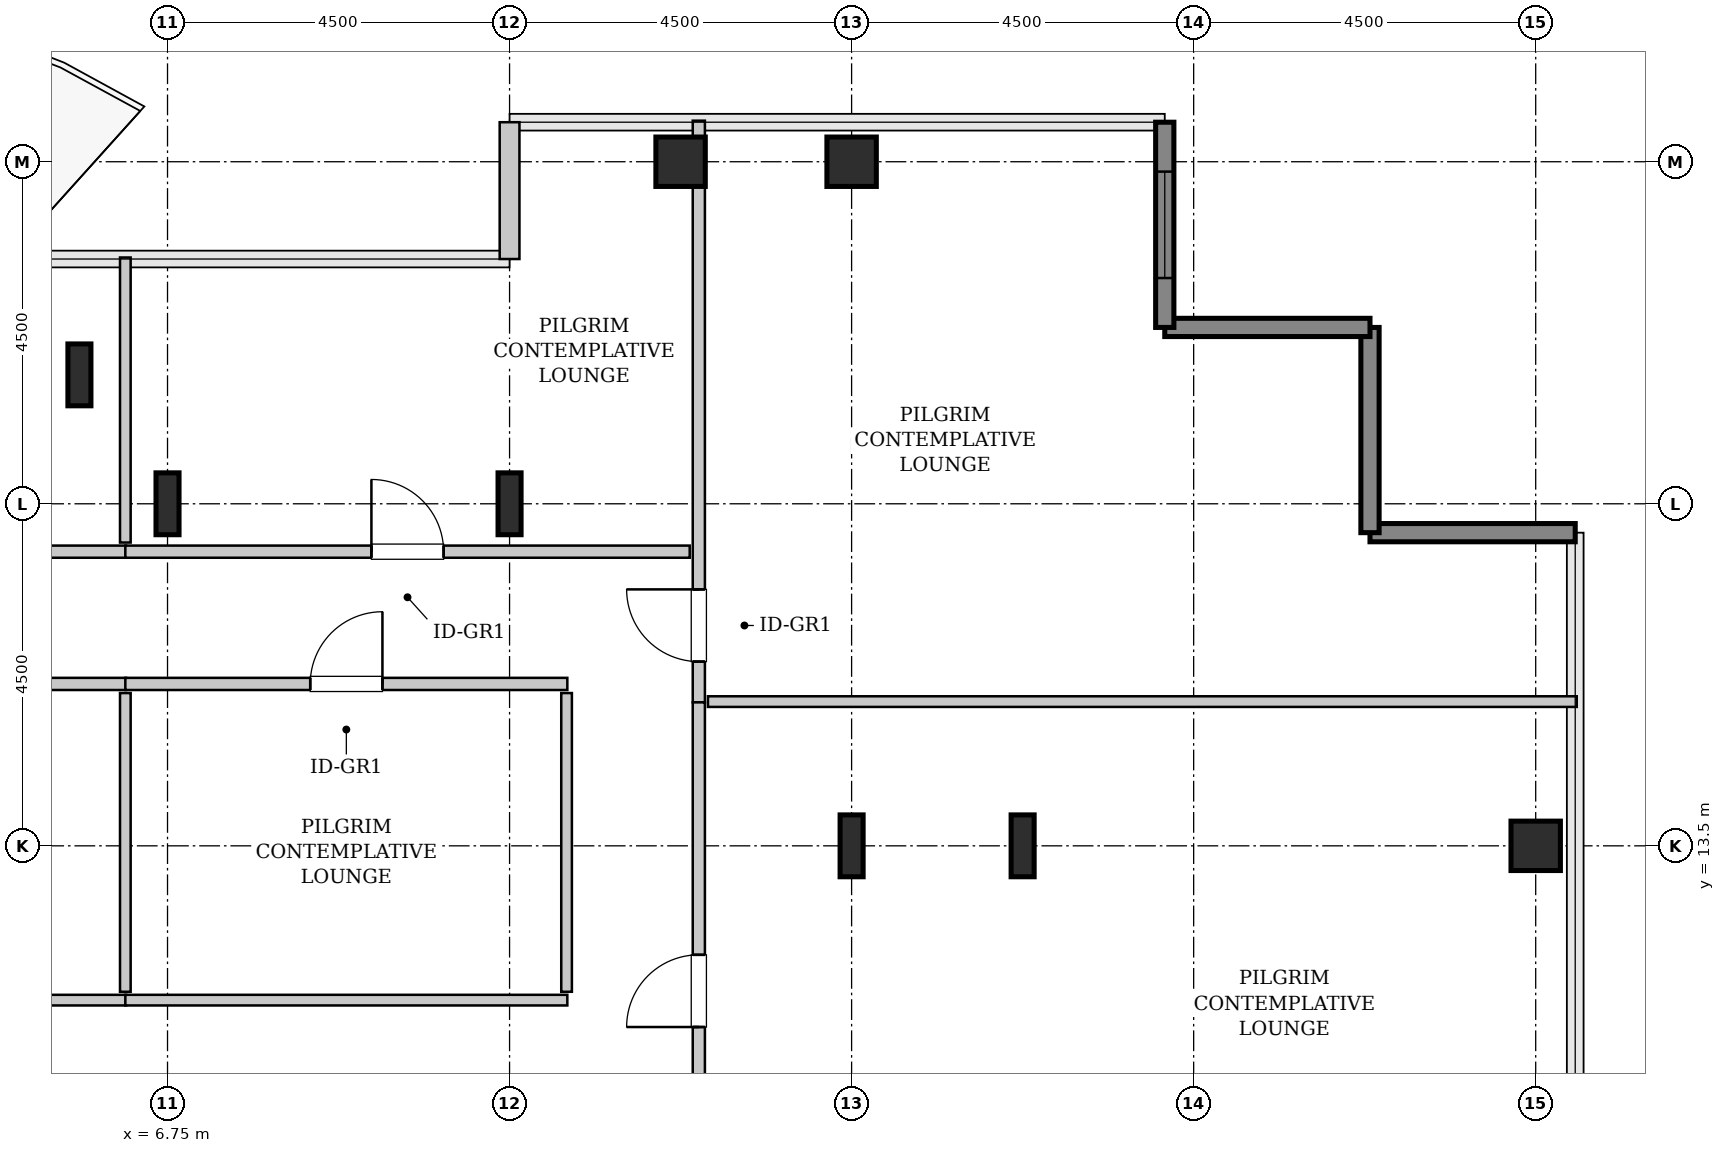
"""IFC4 building model, lengths in metres.
Left out: names, types, materials, properties, quantities, classifications, styles, units other than length and angle.
Written with IfcOpenShell. Run it as: python <this file> out.ifc"""

import sys

from ifc_helpers import new_model, si_unit, direction, frame, frame_2d, origin, origin_2d, place, context, subcontext, project, spatial, rectangle, hollow_rectangle, i_section, extrude, source, transform, mapped, element, fill, save


model = new_model("IFC4")
c1 = context("Model", 3, precision=1e-05, world=origin(), true_north=direction((0.0, 1.0)))
c2 = subcontext(c1, "Body", "Model", "MODEL_VIEW")
j1 = project(units=[si_unit("LENGTHUNIT", "METRE"), si_unit("PLANEANGLEUNIT", "RADIAN")], contexts=[c1])
p1 = place(None, origin())
s1 = spatial("IfcSite", under=j1, at=p1, CompositionType="ELEMENT")
p2 = place(p1, origin())
s2 = spatial("IfcBuilding", under=s1, at=p2, CompositionType="ELEMENT")
p3 = place(p2, frame((0.0, 0.0, 233.2)))
s3 = spatial("IfcBuildingStorey", under=s2, at=p3, CompositionType="ELEMENT", Elevation=233.2)
m1 = source(origin(), c2, "Body", "SweptSolid", [
    extrude(i_section(OverallWidth=0.303, OverallDepth=0.814, WebThickness=0.021, FlangeThickness=0.04, FilletRadius=0.03, at=origin_2d()), origin(), (0.0, 0.0, 1.0), 3.8),
])
for number, where, z_axis, x_axis in (
    (1, (5.591, 19.696, 0.0), (0.0, 0.0, 1.0), (1.0, 0.0, 0.0)),
    (2, (6.75, 18.0, 0.0), (0.0, 0.0, 1.0), (1.0, 0.0, 0.0)),
    (3, (11.25, 18.0, 0.0), (0.0, 0.0, 1.0), (1.0, 0.0, 0.0)),
):
    element("IfcColumn", number, at=place(p3, frame(where, z_axis=z_axis, x_axis=x_axis)), inside=s3, PredefinedType="COLUMN", context=c2, shape_type="MappedRepresentation", body=[
        mapped(m1, transform((0.0, 0.0, 0.0), x_axis=(1.0, 0.0, 0.0), y_axis=(0.0, 1.0, 0.0), z_axis=(0.0, 0.0, 1.0), scale=1.0)),
    ])
m2 = source(origin(), c2, "Body", "SweptSolid", [
    extrude(hollow_rectangle(XDim=0.65, YDim=0.65, WallThickness=0.032, InnerFilletRadius=0.032, OuterFilletRadius=0.064, at=origin_2d()), origin(), (0.0, 0.0, 1.0), 3.8),
])
p4 = place(p3, frame((13.5, 22.5, 0.0), z_axis=(0.0, 0.0, 1.0), x_axis=(1.0, 0.0, 0.0)))
e4 = element("IfcColumn", 4, at=p4, inside=s3, PredefinedType="COLUMN", context=c2, shape_type="MappedRepresentation", body=[
    mapped(m2, transform((0.0, 0.0, 0.0), x_axis=(1.0, 0.0, 0.0), y_axis=(0.0, 1.0, 0.0), z_axis=(0.0, 0.0, 1.0), scale=1.0)),
])
p5 = place(p3, frame((15.75, 13.5, 0.0), z_axis=(0.0, 0.0, 1.0), x_axis=(1.0, 0.0, 0.0)))
e5 = element("IfcColumn", 5, at=p5, inside=s3, PredefinedType="COLUMN", context=c2, shape_type="MappedRepresentation", body=[
    mapped(m1, transform((0.0, 0.0, 0.0), x_axis=(1.0, 0.0, 0.0), y_axis=(0.0, 1.0, 0.0), z_axis=(0.0, 0.0, 1.0), scale=1.0)),
])
p6 = place(p3, frame((15.75, 22.5, 0.0), z_axis=(0.0, 0.0, 1.0), x_axis=(1.0, 0.0, 0.0)))
e6 = element("IfcColumn", 6, at=p6, inside=s3, PredefinedType="COLUMN", context=c2, shape_type="MappedRepresentation", body=[
    mapped(m2, transform((0.0, 0.0, 0.0), x_axis=(1.0, 0.0, 0.0), y_axis=(0.0, 1.0, 0.0), z_axis=(0.0, 0.0, 1.0), scale=1.0)),
])
p7 = place(p3, frame((18.0, 13.5, 0.0), z_axis=(0.0, 0.0, 1.0), x_axis=(1.0, 0.0, 0.0)))
e7 = element("IfcColumn", 7, at=p7, inside=s3, PredefinedType="COLUMN", context=c2, shape_type="MappedRepresentation", body=[
    mapped(m1, transform((0.0, 0.0, 0.0), x_axis=(1.0, 0.0, 0.0), y_axis=(0.0, 1.0, 0.0), z_axis=(0.0, 0.0, 1.0), scale=1.0)),
])
p8 = place(p3, frame((24.75, 13.5, 0.0), z_axis=(0.0, 0.0, 1.0), x_axis=(1.0, 0.0, 0.0)))
e8 = element("IfcColumn", 8, at=p8, inside=s3, PredefinedType="COLUMN", context=c2, shape_type="MappedRepresentation", body=[
    mapped(m2, transform((0.0, 0.0, 0.0), x_axis=(1.0, 0.0, 0.0), y_axis=(0.0, 1.0, 0.0), z_axis=(0.0, 0.0, 1.0), scale=1.0)),
])
m3 = source(origin(), c2, "Body", "SweptSolid", [
    extrude(rectangle(XDim=2.7, YDim=0.24, at=frame_2d((1.35, 0.0))), origin(), (0.0, 0.0, 1.0), 3.55),
])
for number, where, z_axis, x_axis in (
    (9, (25.27, 17.62, 0.0), (0.0, 0.0, 1.0), (-1.0, 0.0, 0.0)),
    (10, (22.57, 17.62, 0.0), (0.0, 0.0, 1.0), (0.0, 1.0, 0.0)),
    (11, (22.57, 20.32, 0.0), (0.0, 0.0, 1.0), (-1.0, 0.0, 0.0)),
):
    element("IfcWall", number, at=place(p3, frame(where, z_axis=z_axis, x_axis=x_axis)), inside=s3, PredefinedType="SHEAR", context=c2, shape_type="MappedRepresentation", body=[
        mapped(m3, transform((0.0, 0.0, 0.0), x_axis=(1.0, 0.0, 0.0), y_axis=(0.0, 1.0, 0.0), z_axis=(0.0, 0.0, 1.0), scale=1.0)),
    ])
p9 = place(p3, frame((19.87, 20.32, 0.0), z_axis=(0.0, 0.0, 1.0), x_axis=(0.0, 1.0, 0.0)))
e12 = element("IfcWall", 12, at=p9, inside=s3, PredefinedType="SHEAR", context=c2, shape_type="MappedRepresentation", body=[
    mapped(m3, transform((0.0, 0.0, 0.0), x_axis=(1.0, 0.0, 0.0), y_axis=(0.0, 1.0, 0.0), z_axis=(0.0, 0.0, 1.0), scale=1.0)),
])
p10 = place(p9, frame((0.65, 0.0, 0.85)))
e13 = element("IfcOpeningElement", 13, at=p10, cuts=e12, PredefinedType="OPENING", context=c2, shape_type="SweptSolid", body=[
    extrude(rectangle(XDim=1.4, YDim=1.8, at=frame_2d((0.7, 0.9))), frame((0.0, 0.13, 0.0), z_axis=(0.0, -1.0, 0.0), x_axis=(1.0, 0.0, 0.0)), (0.0, 0.0, 1.0), 0.26),
])
m4 = source(origin(), c2, "Body", "SweptSolid", [
    extrude(rectangle(XDim=1.8, YDim=0.26, at=frame_2d((0.9, 0.0))), origin(), (0.0, 0.0, 1.0), 3.55),
])
p11 = place(p3, frame((11.25, 23.02, 0.0), z_axis=(0.0, 0.0, 1.0), x_axis=(0.0, -1.0, 0.0)))
e14 = element("IfcWall", 14, at=p11, inside=s3, PredefinedType="SOLIDWALL", context=c2, shape_type="MappedRepresentation", body=[
    mapped(m4, transform((0.0, 0.0, 0.0), x_axis=(1.0, 0.0, 0.0), y_axis=(0.0, 1.0, 0.0), z_axis=(0.0, 0.0, 1.0), scale=1.0)),
])
m5 = source(origin(), c2, "Body", "SweptSolid", [
    extrude(rectangle(XDim=7.653, YDim=0.16, at=frame_2d((3.826, 0.0))), origin(), (0.0, 0.0, 1.0), 3.535),
])
p12 = place(p3, frame((13.74, 15.387, 0.0), z_axis=(0.0, 0.0, 1.0), x_axis=(0.0, 1.0, 0.0)))
e15 = element("IfcWall", 15, at=p12, inside=s3, PredefinedType="PARTITIONING", context=c2, shape_type="MappedRepresentation", body=[
    mapped(m5, transform((0.0, 0.0, 0.0), x_axis=(1.0, 0.0, 0.0), y_axis=(0.0, 1.0, 0.0), z_axis=(0.0, 0.0, 1.0), scale=1.0)),
])
p13 = place(p12, frame((0.536, 0.0, 0.0)))
e16 = element("IfcOpeningElement", 16, at=p13, cuts=e15, PredefinedType="OPENING", context=c2, shape_type="SweptSolid", body=[
    extrude(rectangle(XDim=0.95, YDim=2.1, at=frame_2d((0.475, 1.05))), frame((0.0, 0.09, 0.0), z_axis=(0.0, -1.0, 0.0), x_axis=(1.0, 0.0, 0.0)), (0.0, 0.0, 1.0), 0.18),
])
m6 = source(origin(), c2, "Body", "SweptSolid", [
    extrude(rectangle(XDim=11.43, YDim=0.14, at=frame_2d((5.715, 0.0))), origin(), (0.0, 0.0, 1.0), 3.535),
])
p14 = place(p3, frame((13.86, 15.397, 0.0), z_axis=(0.0, 0.0, 1.0), x_axis=(1.0, 0.0, 0.0)))
e17 = element("IfcWall", 17, at=p14, inside=s3, PredefinedType="PARTITIONING", context=c2, shape_type="MappedRepresentation", body=[
    mapped(m6, transform((0.0, 0.0, 0.0), x_axis=(1.0, 0.0, 0.0), y_axis=(0.0, 1.0, 0.0), z_axis=(0.0, 0.0, 1.0), scale=1.0)),
])
m7 = source(origin(), c2, "Body", "SweptSolid", [
    extrude(rectangle(XDim=7.593, YDim=0.16, at=frame_2d((3.796, 0.0))), origin(), (0.0, 0.0, 1.0), 3.535),
])
p15 = place(p3, frame((13.74, 7.795, 0.0), z_axis=(0.0, 0.0, 1.0), x_axis=(0.0, 1.0, 0.0)))
e18 = element("IfcWall", 18, at=p15, inside=s3, PredefinedType="PARTITIONING", context=c2, shape_type="MappedRepresentation", body=[
    mapped(m7, transform((0.0, 0.0, 0.0), x_axis=(1.0, 0.0, 0.0), y_axis=(0.0, 1.0, 0.0), z_axis=(0.0, 0.0, 1.0), scale=1.0)),
])
p16 = place(p15, frame((3.321, 0.0, 0.0)))
e19 = element("IfcOpeningElement", 19, at=p16, cuts=e18, PredefinedType="OPENING", context=c2, shape_type="SweptSolid", body=[
    extrude(rectangle(XDim=0.95, YDim=2.1, at=frame_2d((0.475, 1.05))), frame((0.0, 0.09, 0.0), z_axis=(0.0, -1.0, 0.0), x_axis=(1.0, 0.0, 0.0)), (0.0, 0.0, 1.0), 0.18),
])
m8 = source(origin(), c2, "Body", "SweptSolid", [
    extrude(rectangle(XDim=9.108, YDim=0.16, at=frame_2d((4.554, 0.0))), origin(), (0.0, 0.0, 1.0), 3.535),
])
p17 = place(p3, frame((-2.903, 15.63, 0.0), z_axis=(0.0, 0.0, 1.0), x_axis=(1.0, 0.0, 0.0)))
e20 = element("IfcWall", 20, at=p17, inside=s3, PredefinedType="PARTITIONING", context=c2, shape_type="MappedRepresentation", body=[
    mapped(m8, transform((0.0, 0.0, 0.0), x_axis=(1.0, 0.0, 0.0), y_axis=(0.0, 1.0, 0.0), z_axis=(0.0, 0.0, 1.0), scale=1.0)),
])
p18 = place(p17, frame((4.079, 0.0, 0.0)))
e21 = element("IfcOpeningElement", 21, at=p18, cuts=e20, PredefinedType="OPENING", context=c2, shape_type="SweptSolid", body=[
    extrude(rectangle(XDim=0.95, YDim=2.1, at=frame_2d((0.475, 1.05))), frame((0.0, 0.09, 0.0), z_axis=(0.0, -1.0, 0.0), x_axis=(1.0, 0.0, 0.0)), (0.0, 0.0, 1.0), 0.18),
])
m9 = source(origin(), c2, "Body", "SweptSolid", [
    extrude(rectangle(XDim=9.108, YDim=0.14, at=frame_2d((4.554, 0.0))), origin(), (0.0, 0.0, 1.0), 3.535),
])
p19 = place(p3, frame((-2.903, 11.47, 0.0), z_axis=(0.0, 0.0, 1.0), x_axis=(1.0, 0.0, 0.0)))
e22 = element("IfcWall", 22, at=p19, inside=s3, PredefinedType="PARTITIONING", context=c2, shape_type="MappedRepresentation", body=[
    mapped(m9, transform((0.0, 0.0, 0.0), x_axis=(1.0, 0.0, 0.0), y_axis=(0.0, 1.0, 0.0), z_axis=(0.0, 0.0, 1.0), scale=1.0)),
])
m10 = source(origin(), c2, "Body", "SweptSolid", [
    extrude(rectangle(XDim=3.93, YDim=0.14, at=frame_2d((1.965, 0.0))), origin(), (0.0, 0.0, 1.0), 3.535),
])
p20 = place(p3, frame((6.195, 11.58, 0.0), z_axis=(0.0, 0.0, 1.0), x_axis=(0.0, 1.0, 0.0)))
e23 = element("IfcWall", 23, at=p20, inside=s3, PredefinedType="PARTITIONING", context=c2, shape_type="MappedRepresentation", body=[
    mapped(m10, transform((0.0, 0.0, 0.0), x_axis=(1.0, 0.0, 0.0), y_axis=(0.0, 1.0, 0.0), z_axis=(0.0, 0.0, 1.0), scale=1.0)),
])
m11 = source(origin(), c2, "Body", "SweptSolid", [
    extrude(rectangle(XDim=6.823, YDim=0.16, at=frame_2d((3.411, 0.0))), origin(), (0.0, 0.0, 1.0), 3.535),
])
p21 = place(p3, frame((-0.617, 17.37, 0.0), z_axis=(0.0, 0.0, 1.0), x_axis=(1.0, 0.0, 0.0)))
e24 = element("IfcWall", 24, at=p21, inside=s3, PredefinedType="PARTITIONING", context=c2, shape_type="MappedRepresentation", body=[
    mapped(m11, transform((0.0, 0.0, 0.0), x_axis=(1.0, 0.0, 0.0), y_axis=(0.0, 1.0, 0.0), z_axis=(0.0, 0.0, 1.0), scale=1.0)),
])
p22 = place(p21, frame((3.361, 0.0, 0.0)))
e25 = element("IfcOpeningElement", 25, at=p22, cuts=e24, PredefinedType="OPENING", context=c2, shape_type="SweptSolid", body=[
    extrude(rectangle(XDim=0.95, YDim=2.1, at=frame_2d((0.475, 1.05))), frame((0.0, 0.09, 0.0), z_axis=(0.0, -1.0, 0.0), x_axis=(1.0, 0.0, 0.0)), (0.0, 0.0, 1.0), 0.18),
])
m12 = source(origin(), c2, "Body", "SweptSolid", [
    extrude(rectangle(XDim=3.75, YDim=0.14, at=frame_2d((1.875, 0.0))), origin(), (0.0, 0.0, 1.0), 3.535),
])
p23 = place(p3, frame((6.195, 17.49, 0.0), z_axis=(0.0, 0.0, 1.0), x_axis=(0.0, 1.0, 0.0)))
e26 = element("IfcWall", 26, at=p23, inside=s3, PredefinedType="PARTITIONING", context=c2, shape_type="MappedRepresentation", body=[
    mapped(m12, transform((0.0, 0.0, 0.0), x_axis=(1.0, 0.0, 0.0), y_axis=(0.0, 1.0, 0.0), z_axis=(0.0, 0.0, 1.0), scale=1.0)),
])
m13 = source(origin(), c2, "Body", "SweptSolid", [
    extrude(rectangle(XDim=7.425, YDim=0.16, at=frame_2d((3.712, 0.0))), origin(), (0.0, 0.0, 1.0), 3.535),
])
p24 = place(p3, frame((6.195, 17.37, 0.0), z_axis=(0.0, 0.0, 1.0), x_axis=(1.0, 0.0, 0.0)))
e27 = element("IfcWall", 27, at=p24, inside=s3, PredefinedType="PARTITIONING", context=c2, shape_type="MappedRepresentation", body=[
    mapped(m13, transform((0.0, 0.0, 0.0), x_axis=(1.0, 0.0, 0.0), y_axis=(0.0, 1.0, 0.0), z_axis=(0.0, 0.0, 1.0), scale=1.0)),
])
p25 = place(p24, frame((3.238, 0.0, 0.0)))
e28 = element("IfcOpeningElement", 28, at=p25, cuts=e27, PredefinedType="OPENING", context=c2, shape_type="SweptSolid", body=[
    extrude(rectangle(XDim=0.95, YDim=2.1, at=frame_2d((0.475, 1.05))), frame((0.0, 0.09, 0.0), z_axis=(0.0, -1.0, 0.0), x_axis=(1.0, 0.0, 0.0)), (0.0, 0.0, 1.0), 0.18),
])
m14 = source(origin(), c2, "Body", "SweptSolid", [
    extrude(rectangle(XDim=5.815, YDim=0.16, at=frame_2d((2.907, 0.0))), origin(), (0.0, 0.0, 1.0), 3.535),
])
p26 = place(p3, frame((6.195, 15.63, 0.0), z_axis=(0.0, 0.0, 1.0), x_axis=(1.0, 0.0, 0.0)))
e29 = element("IfcWall", 29, at=p26, inside=s3, PredefinedType="PARTITIONING", context=c2, shape_type="MappedRepresentation", body=[
    mapped(m14, transform((0.0, 0.0, 0.0), x_axis=(1.0, 0.0, 0.0), y_axis=(0.0, 1.0, 0.0), z_axis=(0.0, 0.0, 1.0), scale=1.0)),
])
p27 = place(p26, frame((2.433, 0.0, 0.0)))
e30 = element("IfcOpeningElement", 30, at=p27, cuts=e29, PredefinedType="OPENING", context=c2, shape_type="SweptSolid", body=[
    extrude(rectangle(XDim=0.95, YDim=2.1, at=frame_2d((0.475, 1.05))), frame((0.0, 0.09, 0.0), z_axis=(0.0, -1.0, 0.0), x_axis=(1.0, 0.0, 0.0)), (0.0, 0.0, 1.0), 0.18),
])
m15 = source(origin(), c2, "Body", "SweptSolid", [
    extrude(rectangle(XDim=5.815, YDim=0.14, at=frame_2d((2.907, 0.0))), origin(), (0.0, 0.0, 1.0), 3.535),
])
p28 = place(p3, frame((6.195, 11.47, 0.0), z_axis=(0.0, 0.0, 1.0), x_axis=(1.0, 0.0, 0.0)))
e31 = element("IfcWall", 31, at=p28, inside=s3, PredefinedType="PARTITIONING", context=c2, shape_type="MappedRepresentation", body=[
    mapped(m15, transform((0.0, 0.0, 0.0), x_axis=(1.0, 0.0, 0.0), y_axis=(0.0, 1.0, 0.0), z_axis=(0.0, 0.0, 1.0), scale=1.0)),
])
p29 = place(p3, frame((12.0, 11.58, 0.0), z_axis=(0.0, 0.0, 1.0), x_axis=(0.0, 1.0, 0.0)))
e32 = element("IfcWall", 32, at=p29, inside=s3, PredefinedType="PARTITIONING", context=c2, shape_type="MappedRepresentation", body=[
    mapped(m10, transform((0.0, 0.0, 0.0), x_axis=(1.0, 0.0, 0.0), y_axis=(0.0, 1.0, 0.0), z_axis=(0.0, 0.0, 1.0), scale=1.0)),
])
m16 = source(origin(), c2, "Body", "SweptSolid", [
    extrude(rectangle(XDim=1.4, YDim=1.8, at=frame_2d((0.7, 0.9))), frame((0.0, 0.03, 0.0), z_axis=(0.0, -1.0, 0.0), x_axis=(1.0, 0.0, 0.0)), (0.0, 0.0, 1.0), 0.06),
])
p30 = place(p10, origin())
e33 = element("IfcWindow", 33, at=p30, inside=s3, PartitioningType="SINGLE_PANEL", PredefinedType="WINDOW", context=c2, shape_type="MappedRepresentation", body=[
    mapped(m16, transform((0.0, 0.0, 0.0), x_axis=(1.0, 0.0, 0.0), y_axis=(0.0, 1.0, 0.0), z_axis=(0.0, 0.0, 1.0), scale=1.0)),
])
fill(e13, e33)
m17 = source(origin(), c2, "Body", "SweptSolid", [
    extrude(rectangle(XDim=0.95, YDim=2.1, at=frame_2d((0.475, 1.05))), frame((0.0, 0.025, 0.0), z_axis=(0.0, -1.0, 0.0), x_axis=(1.0, 0.0, 0.0)), (0.0, 0.0, 1.0), 0.05),
])
p31 = place(p13, origin())
e34 = element("IfcDoor", 34, at=p31, inside=s3, OperationType="SINGLE_SWING_RIGHT", PredefinedType="DOOR", context=c2, shape_type="MappedRepresentation", body=[
    mapped(m17, transform((0.0, 0.0, 0.0), x_axis=(1.0, 0.0, 0.0), y_axis=(0.0, 1.0, 0.0), z_axis=(0.0, 0.0, 1.0), scale=1.0)),
])
fill(e16, e34)
p32 = place(p16, origin())
e35 = element("IfcDoor", 35, at=p32, inside=s3, OperationType="SINGLE_SWING_LEFT", PredefinedType="DOOR", context=c2, shape_type="MappedRepresentation", body=[
    mapped(m17, transform((0.0, 0.0, 0.0), x_axis=(1.0, 0.0, 0.0), y_axis=(0.0, 1.0, 0.0), z_axis=(0.0, 0.0, 1.0), scale=1.0)),
])
fill(e19, e35)
p33 = place(p25, origin())
e36 = element("IfcDoor", 36, at=p33, inside=s3, OperationType="SINGLE_SWING_LEFT", PredefinedType="DOOR", context=c2, shape_type="MappedRepresentation", body=[
    mapped(m17, transform((0.0, 0.0, 0.0), x_axis=(1.0, 0.0, 0.0), y_axis=(0.0, 1.0, 0.0), z_axis=(0.0, 0.0, 1.0), scale=1.0)),
])
fill(e28, e36)
p34 = place(p27, origin())
e37 = element("IfcDoor", 37, at=p34, inside=s3, OperationType="SINGLE_SWING_RIGHT", PredefinedType="DOOR", context=c2, shape_type="MappedRepresentation", body=[
    mapped(m17, transform((0.0, 0.0, 0.0), x_axis=(1.0, 0.0, 0.0), y_axis=(0.0, 1.0, 0.0), z_axis=(0.0, 0.0, 1.0), scale=1.0)),
])
fill(e30, e37)
save(model, sys.argv[1])
